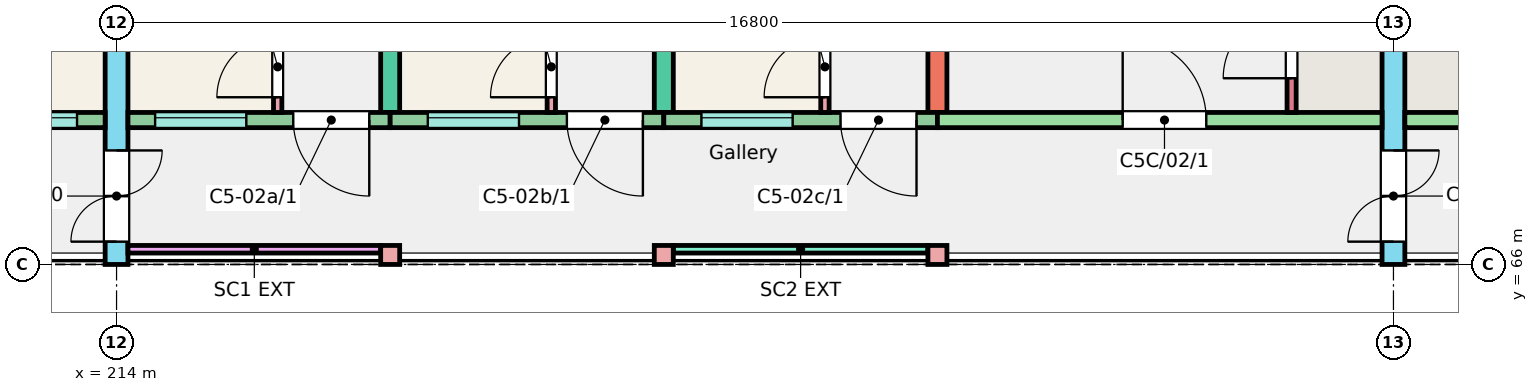
"""IFC4 building model, lengths in metres.
Left out: names, types, materials, properties, quantities, classifications, styles, units other than length and angle.
Written with IfcOpenShell. Run it as: python <this file> out.ifc"""

import sys

from ifc_helpers import new_model, si_unit, direction, frame, frame_2d, origin, origin_2d, place, context, subcontext, project, spatial, rectangle, extrude, element, fill, save


model = new_model("IFC4")
c1 = context("Model", 3, precision=1e-05, world=origin(), true_north=direction((0.0, 1.0)))
c2 = subcontext(c1, "Body", "Model", "MODEL_VIEW")
j1 = project(units=[si_unit("LENGTHUNIT", "METRE"), si_unit("PLANEANGLEUNIT", "RADIAN")], contexts=[c1])
p1 = place(None, origin())
s1 = spatial("IfcSite", under=j1, at=p1, CompositionType="ELEMENT")
p2 = place(p1, origin())
s2 = spatial("IfcBuilding", under=s1, at=p2, CompositionType="ELEMENT")
p3 = place(p2, frame((0.0, 0.0, 6.0)))
s3 = spatial("IfcBuildingStorey", under=s2, at=p3, CompositionType="ELEMENT", Elevation=6.0)
p4 = place(p3, frame((214.0, 66.0, 0.0), z_axis=(0.0, 0.0, 1.0), x_axis=(0.0, 1.0, 0.0)))
e1 = element("IfcWall", 1, at=p4, inside=s3, PredefinedType="SHEAR", context=c2, shape_type="SweptSolid", body=[
    extrude(rectangle(XDim=11.0, YDim=0.3, at=frame_2d((5.5, 0.0))), origin(), (0.0, 0.0, 1.0), 3.0),
])
p5 = place(p4, frame((0.3, 0.0, 0.0)))
e2 = element("IfcOpeningElement", 2, at=p5, cuts=e1, PredefinedType="OPENING", context=c2, shape_type="SweptSolid", body=[
    extrude(rectangle(XDim=1.2, YDim=2.1, at=frame_2d((0.6, 1.05))), frame((0.0, 0.16, 0.0), z_axis=(0.0, -1.0, 0.0), x_axis=(1.0, 0.0, 0.0)), (0.0, 0.0, 1.0), 0.32),
])
for number, where, z_axis, x_axis in (
    (3, (217.6, 68.0, 0.0), (0.0, 0.0, 1.0), (0.0, 1.0, 0.0)),
    (4, (221.2, 68.0, 0.0), (0.0, 0.0, 1.0), (0.0, 1.0, 0.0)),
    (5, (224.8, 68.0, 0.0), (0.0, 0.0, 1.0), (0.0, 1.0, 0.0)),
):
    element("IfcWall", number, at=place(p3, frame(where, z_axis=z_axis, x_axis=x_axis)), inside=s3, PredefinedType="SHEAR", context=c2, shape_type="SweptSolid", body=[
        extrude(rectangle(XDim=9.0, YDim=0.25, at=frame_2d((4.5, 0.0))), origin(), (0.0, 0.0, 1.0), 3.0),
    ])
p6 = place(p3, frame((230.8, 66.0, 0.0), z_axis=(0.0, 0.0, 1.0), x_axis=(0.0, 1.0, 0.0)))
e6 = element("IfcWall", 6, at=p6, inside=s3, PredefinedType="SHEAR", context=c2, shape_type="SweptSolid", body=[
    extrude(rectangle(XDim=11.0, YDim=0.3, at=frame_2d((5.5, 0.0))), origin(), (0.0, 0.0, 1.0), 3.0),
])
p7 = place(p6, frame((0.3, 0.0, 0.0)))
e7 = element("IfcOpeningElement", 7, at=p7, cuts=e6, PredefinedType="OPENING", context=c2, shape_type="SweptSolid", body=[
    extrude(rectangle(XDim=1.2, YDim=2.1, at=frame_2d((0.6, 1.05))), frame((0.0, 0.16, 0.0), z_axis=(0.0, -1.0, 0.0), x_axis=(1.0, 0.0, 0.0)), (0.0, 0.0, 1.0), 0.32),
])
p8 = place(p3, frame((210.4, 67.9, 0.0), z_axis=(0.0, 0.0, 1.0), x_axis=(1.0, 0.0, 0.0)))
e8 = element("IfcWall", 8, at=p8, inside=s3, PredefinedType="SOLIDWALL", context=c2, shape_type="SweptSolid", body=[
    extrude(rectangle(XDim=3.45, YDim=0.2, at=frame_2d((1.725, 0.0))), origin(), (0.0, 0.0, 1.0), 3.0),
])
p9 = place(p8, frame((1.88, 0.0, 1.1)))
e9 = element("IfcOpeningElement", 9, at=p9, cuts=e8, PredefinedType="OPENING", context=c2, shape_type="SweptSolid", body=[
    extrude(rectangle(XDim=1.2, YDim=1.3, at=frame_2d((0.6, 0.65))), frame((0.0, 0.11, 0.0), z_axis=(0.0, -1.0, 0.0), x_axis=(1.0, 0.0, 0.0)), (0.0, 0.0, 1.0), 0.22),
])
p10 = place(p8, frame((0.25, 0.0, 0.0)))
e10 = element("IfcOpeningElement", 10, at=p10, cuts=e8, PredefinedType="OPENING", context=c2, shape_type="SweptSolid", body=[
    extrude(rectangle(XDim=1.0, YDim=2.1, at=frame_2d((0.5, 1.05))), frame((0.0, 0.11, 0.0), z_axis=(0.0, -1.0, 0.0), x_axis=(1.0, 0.0, 0.0)), (0.0, 0.0, 1.0), 0.22),
])
p11 = place(p3, frame((214.15, 67.9, 0.0), z_axis=(0.0, 0.0, 1.0), x_axis=(1.0, 0.0, 0.0)))
e11 = element("IfcWall", 11, at=p11, inside=s3, PredefinedType="SOLIDWALL", context=c2, shape_type="SweptSolid", body=[
    extrude(rectangle(XDim=3.45, YDim=0.2, at=frame_2d((1.725, 0.0))), origin(), (0.0, 0.0, 1.0), 3.0),
])
p12 = place(p11, frame((0.357, 0.0, 1.1)))
e12 = element("IfcOpeningElement", 12, at=p12, cuts=e11, PredefinedType="OPENING", context=c2, shape_type="SweptSolid", body=[
    extrude(rectangle(XDim=1.2, YDim=1.3, at=frame_2d((0.6, 0.65))), frame((0.0, 0.11, 0.0), z_axis=(0.0, -1.0, 0.0), x_axis=(1.0, 0.0, 0.0)), (0.0, 0.0, 1.0), 0.22),
])
p13 = place(p11, frame((2.175, 0.0, 0.0)))
e13 = element("IfcOpeningElement", 13, at=p13, cuts=e11, PredefinedType="OPENING", context=c2, shape_type="SweptSolid", body=[
    extrude(rectangle(XDim=1.0, YDim=2.1, at=frame_2d((0.5, 1.05))), frame((0.0, 0.11, 0.0), z_axis=(0.0, -1.0, 0.0), x_axis=(1.0, 0.0, 0.0)), (0.0, 0.0, 1.0), 0.22),
])
p14 = place(p3, frame((217.6, 67.9, 0.0), z_axis=(0.0, 0.0, 1.0), x_axis=(1.0, 0.0, 0.0)))
e14 = element("IfcWall", 14, at=p14, inside=s3, PredefinedType="SOLIDWALL", context=c2, shape_type="SweptSolid", body=[
    extrude(rectangle(XDim=3.6, YDim=0.2, at=frame_2d((1.8, 0.0))), origin(), (0.0, 0.0, 1.0), 3.0),
])
p15 = place(p14, frame((0.495, 0.0, 1.1)))
e15 = element("IfcOpeningElement", 15, at=p15, cuts=e14, PredefinedType="OPENING", context=c2, shape_type="SweptSolid", body=[
    extrude(rectangle(XDim=1.2, YDim=1.3, at=frame_2d((0.6, 0.65))), frame((0.0, 0.11, 0.0), z_axis=(0.0, -1.0, 0.0), x_axis=(1.0, 0.0, 0.0)), (0.0, 0.0, 1.0), 0.22),
])
p16 = place(p14, frame((2.325, 0.0, 0.0)))
e16 = element("IfcOpeningElement", 16, at=p16, cuts=e14, PredefinedType="OPENING", context=c2, shape_type="SweptSolid", body=[
    extrude(rectangle(XDim=1.0, YDim=2.1, at=frame_2d((0.5, 1.05))), frame((0.0, 0.11, 0.0), z_axis=(0.0, -1.0, 0.0), x_axis=(1.0, 0.0, 0.0)), (0.0, 0.0, 1.0), 0.22),
])
p17 = place(p3, frame((221.2, 67.9, 0.0), z_axis=(0.0, 0.0, 1.0), x_axis=(1.0, 0.0, 0.0)))
e17 = element("IfcWall", 17, at=p17, inside=s3, PredefinedType="SOLIDWALL", context=c2, shape_type="SweptSolid", body=[
    extrude(rectangle(XDim=3.6, YDim=0.2, at=frame_2d((1.8, 0.0))), origin(), (0.0, 0.0, 1.0), 3.0),
])
p18 = place(p17, frame((0.495, 0.0, 1.1)))
e18 = element("IfcOpeningElement", 18, at=p18, cuts=e17, PredefinedType="OPENING", context=c2, shape_type="SweptSolid", body=[
    extrude(rectangle(XDim=1.2, YDim=1.3, at=frame_2d((0.6, 0.65))), frame((0.0, 0.11, 0.0), z_axis=(0.0, -1.0, 0.0), x_axis=(1.0, 0.0, 0.0)), (0.0, 0.0, 1.0), 0.22),
])
p19 = place(p17, frame((2.325, 0.0, 0.0)))
e19 = element("IfcOpeningElement", 19, at=p19, cuts=e17, PredefinedType="OPENING", context=c2, shape_type="SweptSolid", body=[
    extrude(rectangle(XDim=1.0, YDim=2.1, at=frame_2d((0.5, 1.05))), frame((0.0, 0.11, 0.0), z_axis=(0.0, -1.0, 0.0), x_axis=(1.0, 0.0, 0.0)), (0.0, 0.0, 1.0), 0.22),
])
p20 = place(p3, frame((224.8, 67.9, 0.0), z_axis=(0.0, 0.0, 1.0), x_axis=(1.0, 0.0, 0.0)))
e20 = element("IfcWall", 20, at=p20, inside=s3, PredefinedType="SHEAR", context=c2, shape_type="SweptSolid", body=[
    extrude(rectangle(XDim=5.85, YDim=0.2, at=frame_2d((2.925, 0.0))), origin(), (0.0, 0.0, 1.0), 3.0),
])
p21 = place(p20, frame((2.438, 0.0, 0.0)))
e21 = element("IfcOpeningElement", 21, at=p21, cuts=e20, PredefinedType="OPENING", context=c2, shape_type="SweptSolid", body=[
    extrude(rectangle(XDim=1.1, YDim=2.1, at=frame_2d((0.55, 1.05))), frame((0.0, 0.11, 0.0), z_axis=(0.0, -1.0, 0.0), x_axis=(1.0, 0.0, 0.0)), (0.0, 0.0, 1.0), 0.22),
])
p22 = place(p3, frame((229.46, 68.0, 0.0), z_axis=(0.0, 0.0, 1.0), x_axis=(0.0, 1.0, 0.0)))
e22 = element("IfcWall", 22, at=p22, inside=s3, PredefinedType="SHEAR", context=c2, shape_type="SweptSolid", body=[
    extrude(rectangle(XDim=1.72, YDim=0.12, at=frame_2d((0.86, 0.0))), origin(), (0.0, 0.0, 1.0), 3.0),
])
p23 = place(p22, frame((0.45, 0.0, 0.0)))
e23 = element("IfcOpeningElement", 23, at=p23, cuts=e22, PredefinedType="OPENING", context=c2, shape_type="SweptSolid", body=[
    extrude(rectangle(XDim=0.9, YDim=2.1, at=frame_2d((0.45, 1.05))), frame((0.0, 0.07, 0.0), z_axis=(0.0, -1.0, 0.0), x_axis=(1.0, 0.0, 0.0)), (0.0, 0.0, 1.0), 0.14),
])
p24 = place(p3, frame((230.95, 67.9, 0.0), z_axis=(0.0, 0.0, 1.0), x_axis=(1.0, 0.0, 0.0)))
e24 = element("IfcWall", 24, at=p24, inside=s3, PredefinedType="SHEAR", context=c2, shape_type="SweptSolid", body=[
    extrude(rectangle(XDim=5.85, YDim=0.2, at=frame_2d((2.925, 0.0))), origin(), (0.0, 0.0, 1.0), 3.0),
])
p25 = place(p24, frame((2.312, 0.0, 0.0)))
e25 = element("IfcOpeningElement", 25, at=p25, cuts=e24, PredefinedType="OPENING", context=c2, shape_type="SweptSolid", body=[
    extrude(rectangle(XDim=1.1, YDim=2.1, at=frame_2d((0.55, 1.05))), frame((0.0, 0.11, 0.0), z_axis=(0.0, -1.0, 0.0), x_axis=(1.0, 0.0, 0.0)), (0.0, 0.0, 1.0), 0.22),
])
for number, where, z_axis, x_axis in (
    (26, (217.6, 66.125, 0.0), (0.0, 0.0, 1.0), (1.0, 0.0, 0.0)),
    (27, (221.2, 66.125, 0.0), (0.0, 0.0, 1.0), (1.0, 0.0, 0.0)),
    (28, (224.8, 66.125, 0.0), (0.0, 0.0, 1.0), (1.0, 0.0, 0.0)),
):
    element("IfcColumn", number, at=place(p3, frame(where, z_axis=z_axis, x_axis=x_axis)), inside=s3, PredefinedType="COLUMN", context=c2, shape_type="SweptSolid", body=[
        extrude(rectangle(XDim=0.25, YDim=0.25, at=origin_2d()), origin(), (0.0, 0.0, 1.0), 3.0),
    ])
p26 = place(p3, frame((214.15, 66.2, 0.0), z_axis=(0.0, 0.0, 1.0), x_axis=(1.0, 0.0, 0.0)))
e29 = element("IfcWall", 29, at=p26, inside=s3, PredefinedType="SOLIDWALL", context=c2, shape_type="SweptSolid", body=[
    extrude(rectangle(XDim=3.325, YDim=0.1, at=frame_2d((1.663, 0.0))), origin(), (0.0, 0.0, 1.0), 2.45),
])
p27 = place(p3, frame((221.325, 66.2, 0.0), z_axis=(0.0, 0.0, 1.0), x_axis=(1.0, 0.0, 0.0)))
e30 = element("IfcWall", 30, at=p27, inside=s3, PredefinedType="SOLIDWALL", context=c2, shape_type="SweptSolid", body=[
    extrude(rectangle(XDim=3.35, YDim=0.1, at=frame_2d((1.675, 0.0))), origin(), (0.0, 0.0, 1.0), 2.45),
])
p28 = place(p3, frame((216.12, 68.0, 0.0), z_axis=(0.0, 0.0, 1.0), x_axis=(0.0, 1.0, 0.0)))
e31 = element("IfcWall", 31, at=p28, inside=s3, PredefinedType="PARTITIONING", context=c2, shape_type="SweptSolid", body=[
    extrude(rectangle(XDim=4.3, YDim=0.11, at=frame_2d((2.15, 0.0))), origin(), (0.0, 0.0, 1.0), 2.8),
])
p29 = place(p28, frame((0.2, 0.0, 0.0)))
e32 = element("IfcOpeningElement", 32, at=p29, cuts=e31, PredefinedType="OPENING", context=c2, shape_type="SweptSolid", body=[
    extrude(rectangle(XDim=0.8, YDim=2.1, at=frame_2d((0.4, 1.05))), frame((0.0, 0.065, 0.0), z_axis=(0.0, -1.0, 0.0), x_axis=(1.0, 0.0, 0.0)), (0.0, 0.0, 1.0), 0.13),
])
p30 = place(p28, frame((3.35, 0.0, 0.0)))
e33 = element("IfcOpeningElement", 33, at=p30, cuts=e31, PredefinedType="OPENING", context=c2, shape_type="SweptSolid", body=[
    extrude(rectangle(XDim=0.8, YDim=2.1, at=frame_2d((0.4, 1.05))), frame((0.0, 0.065, 0.0), z_axis=(0.0, -1.0, 0.0), x_axis=(1.0, 0.0, 0.0)), (0.0, 0.0, 1.0), 0.13),
])
p31 = place(p3, frame((219.72, 68.0, 0.0), z_axis=(0.0, 0.0, 1.0), x_axis=(0.0, 1.0, 0.0)))
e34 = element("IfcWall", 34, at=p31, inside=s3, PredefinedType="PARTITIONING", context=c2, shape_type="SweptSolid", body=[
    extrude(rectangle(XDim=4.3, YDim=0.11, at=frame_2d((2.15, 0.0))), origin(), (0.0, 0.0, 1.0), 2.8),
])
p32 = place(p31, frame((0.2, 0.0, 0.0)))
e35 = element("IfcOpeningElement", 35, at=p32, cuts=e34, PredefinedType="OPENING", context=c2, shape_type="SweptSolid", body=[
    extrude(rectangle(XDim=0.8, YDim=2.1, at=frame_2d((0.4, 1.05))), frame((0.0, 0.065, 0.0), z_axis=(0.0, -1.0, 0.0), x_axis=(1.0, 0.0, 0.0)), (0.0, 0.0, 1.0), 0.13),
])
p33 = place(p31, frame((3.35, 0.0, 0.0)))
e36 = element("IfcOpeningElement", 36, at=p33, cuts=e34, PredefinedType="OPENING", context=c2, shape_type="SweptSolid", body=[
    extrude(rectangle(XDim=0.8, YDim=2.1, at=frame_2d((0.4, 1.05))), frame((0.0, 0.065, 0.0), z_axis=(0.0, -1.0, 0.0), x_axis=(1.0, 0.0, 0.0)), (0.0, 0.0, 1.0), 0.13),
])
p34 = place(p3, frame((223.32, 68.0, 0.0), z_axis=(0.0, 0.0, 1.0), x_axis=(0.0, 1.0, 0.0)))
e37 = element("IfcWall", 37, at=p34, inside=s3, PredefinedType="PARTITIONING", context=c2, shape_type="SweptSolid", body=[
    extrude(rectangle(XDim=4.7, YDim=0.11, at=frame_2d((2.35, 0.0))), origin(), (0.0, 0.0, 1.0), 2.8),
])
p35 = place(p34, frame((0.2, 0.0, 0.0)))
e38 = element("IfcOpeningElement", 38, at=p35, cuts=e37, PredefinedType="OPENING", context=c2, shape_type="SweptSolid", body=[
    extrude(rectangle(XDim=0.8, YDim=2.1, at=frame_2d((0.4, 1.05))), frame((0.0, 0.065, 0.0), z_axis=(0.0, -1.0, 0.0), x_axis=(1.0, 0.0, 0.0)), (0.0, 0.0, 1.0), 0.13),
])
p36 = place(p34, frame((3.75, 0.0, 0.0)))
e39 = element("IfcOpeningElement", 39, at=p36, cuts=e37, PredefinedType="OPENING", context=c2, shape_type="SweptSolid", body=[
    extrude(rectangle(XDim=0.8, YDim=2.1, at=frame_2d((0.4, 1.05))), frame((0.0, 0.065, 0.0), z_axis=(0.0, -1.0, 0.0), x_axis=(1.0, 0.0, 0.0)), (0.0, 0.0, 1.0), 0.13),
])
p37 = place(p9, origin())
e40 = element("IfcWindow", 40, at=p37, inside=s3, PartitioningType="SINGLE_PANEL", PredefinedType="WINDOW", context=c2, shape_type="SweptSolid", body=[
    extrude(rectangle(XDim=1.2, YDim=1.3, at=frame_2d((0.6, 0.65))), frame((0.0, 0.06, 0.0), z_axis=(0.0, -1.0, 0.0), x_axis=(1.0, 0.0, 0.0)), (0.0, 0.0, 1.0), 0.06),
])
fill(e9, e40)
p38 = place(p12, origin())
e41 = element("IfcWindow", 41, at=p38, inside=s3, PartitioningType="SINGLE_PANEL", PredefinedType="WINDOW", context=c2, shape_type="SweptSolid", body=[
    extrude(rectangle(XDim=1.2, YDim=1.3, at=frame_2d((0.6, 0.65))), frame((0.0, 0.06, 0.0), z_axis=(0.0, -1.0, 0.0), x_axis=(1.0, 0.0, 0.0)), (0.0, 0.0, 1.0), 0.06),
])
fill(e12, e41)
p39 = place(p15, origin())
e42 = element("IfcWindow", 42, at=p39, inside=s3, PartitioningType="SINGLE_PANEL", PredefinedType="WINDOW", context=c2, shape_type="SweptSolid", body=[
    extrude(rectangle(XDim=1.2, YDim=1.3, at=frame_2d((0.6, 0.65))), frame((0.0, 0.06, 0.0), z_axis=(0.0, -1.0, 0.0), x_axis=(1.0, 0.0, 0.0)), (0.0, 0.0, 1.0), 0.06),
])
fill(e15, e42)
p40 = place(p18, origin())
e43 = element("IfcWindow", 43, at=p40, inside=s3, PartitioningType="SINGLE_PANEL", PredefinedType="WINDOW", context=c2, shape_type="SweptSolid", body=[
    extrude(rectangle(XDim=1.2, YDim=1.3, at=frame_2d((0.6, 0.65))), frame((0.0, 0.06, 0.0), z_axis=(0.0, -1.0, 0.0), x_axis=(1.0, 0.0, 0.0)), (0.0, 0.0, 1.0), 0.06),
])
fill(e18, e43)
p41 = place(p13, origin())
e44 = element("IfcDoor", 44, at=p41, inside=s3, OperationType="SINGLE_SWING_RIGHT", PredefinedType="DOOR", context=c2, shape_type="SweptSolid", body=[
    extrude(rectangle(XDim=1.0, YDim=2.1, at=frame_2d((0.5, 1.05))), frame((0.0, 0.025, 0.0), z_axis=(0.0, -1.0, 0.0), x_axis=(1.0, 0.0, 0.0)), (0.0, 0.0, 1.0), 0.05),
])
fill(e13, e44)
p42 = place(p29, origin())
e45 = element("IfcDoor", 45, at=p42, inside=s3, OperationType="SINGLE_SWING_LEFT", PredefinedType="DOOR", context=c2, shape_type="SweptSolid", body=[
    extrude(rectangle(XDim=0.8, YDim=2.1, at=frame_2d((0.4, 1.05))), frame((0.0, 0.025, 0.0), z_axis=(0.0, -1.0, 0.0), x_axis=(1.0, 0.0, 0.0)), (0.0, 0.0, 1.0), 0.05),
])
fill(e32, e45)
p43 = place(p16, origin())
e46 = element("IfcDoor", 46, at=p43, inside=s3, OperationType="SINGLE_SWING_RIGHT", PredefinedType="DOOR", context=c2, shape_type="SweptSolid", body=[
    extrude(rectangle(XDim=1.0, YDim=2.1, at=frame_2d((0.5, 1.05))), frame((0.0, 0.025, 0.0), z_axis=(0.0, -1.0, 0.0), x_axis=(1.0, 0.0, 0.0)), (0.0, 0.0, 1.0), 0.05),
])
fill(e16, e46)
p44 = place(p32, origin())
e47 = element("IfcDoor", 47, at=p44, inside=s3, OperationType="SINGLE_SWING_LEFT", PredefinedType="DOOR", context=c2, shape_type="SweptSolid", body=[
    extrude(rectangle(XDim=0.8, YDim=2.1, at=frame_2d((0.4, 1.05))), frame((0.0, 0.025, 0.0), z_axis=(0.0, -1.0, 0.0), x_axis=(1.0, 0.0, 0.0)), (0.0, 0.0, 1.0), 0.05),
])
fill(e35, e47)
p45 = place(p19, origin())
e48 = element("IfcDoor", 48, at=p45, inside=s3, OperationType="SINGLE_SWING_RIGHT", PredefinedType="DOOR", context=c2, shape_type="SweptSolid", body=[
    extrude(rectangle(XDim=1.0, YDim=2.1, at=frame_2d((0.5, 1.05))), frame((0.0, 0.025, 0.0), z_axis=(0.0, -1.0, 0.0), x_axis=(1.0, 0.0, 0.0)), (0.0, 0.0, 1.0), 0.05),
])
fill(e19, e48)
p46 = place(p35, origin())
e49 = element("IfcDoor", 49, at=p46, inside=s3, OperationType="SINGLE_SWING_LEFT", PredefinedType="DOOR", context=c2, shape_type="SweptSolid", body=[
    extrude(rectangle(XDim=0.8, YDim=2.1, at=frame_2d((0.4, 1.05))), frame((0.0, 0.025, 0.0), z_axis=(0.0, -1.0, 0.0), x_axis=(1.0, 0.0, 0.0)), (0.0, 0.0, 1.0), 0.05),
])
fill(e38, e49)
p47 = place(p21, origin())
e50 = element("IfcDoor", 50, at=p47, inside=s3, OperationType="SINGLE_SWING_LEFT", PredefinedType="DOOR", context=c2, shape_type="SweptSolid", body=[
    extrude(rectangle(XDim=1.1, YDim=2.1, at=frame_2d((0.55, 1.05))), frame((0.0, 0.025, 0.0), z_axis=(0.0, -1.0, 0.0), x_axis=(1.0, 0.0, 0.0)), (0.0, 0.0, 1.0), 0.05),
])
fill(e21, e50)
p48 = place(p23, origin())
e51 = element("IfcDoor", 51, at=p48, inside=s3, OperationType="SINGLE_SWING_LEFT", PredefinedType="DOOR", context=c2, shape_type="SweptSolid", body=[
    extrude(rectangle(XDim=0.9, YDim=2.1, at=frame_2d((0.45, 1.05))), frame((0.0, 0.025, 0.0), z_axis=(0.0, -1.0, 0.0), x_axis=(1.0, 0.0, 0.0)), (0.0, 0.0, 1.0), 0.05),
])
fill(e23, e51)
p49 = place(p5, origin())
e52 = element("IfcDoor", 52, at=p49, inside=s3, OperationType="DOUBLE_DOOR_SINGLE_SWING", PredefinedType="DOOR", context=c2, shape_type="SweptSolid", body=[
    extrude(rectangle(XDim=1.2, YDim=2.1, at=frame_2d((0.6, 1.05))), frame((0.0, 0.025, 0.0), z_axis=(0.0, -1.0, 0.0), x_axis=(1.0, 0.0, 0.0)), (0.0, 0.0, 1.0), 0.05),
])
fill(e2, e52)
p50 = place(p7, origin())
e53 = element("IfcDoor", 53, at=p50, inside=s3, OperationType="DOUBLE_DOOR_SINGLE_SWING", PredefinedType="DOOR", context=c2, shape_type="SweptSolid", body=[
    extrude(rectangle(XDim=1.2, YDim=2.1, at=frame_2d((0.6, 1.05))), frame((0.0, 0.025, 0.0), z_axis=(0.0, -1.0, 0.0), x_axis=(1.0, 0.0, 0.0)), (0.0, 0.0, 1.0), 0.05),
])
fill(e7, e53)
save(model, sys.argv[1])
